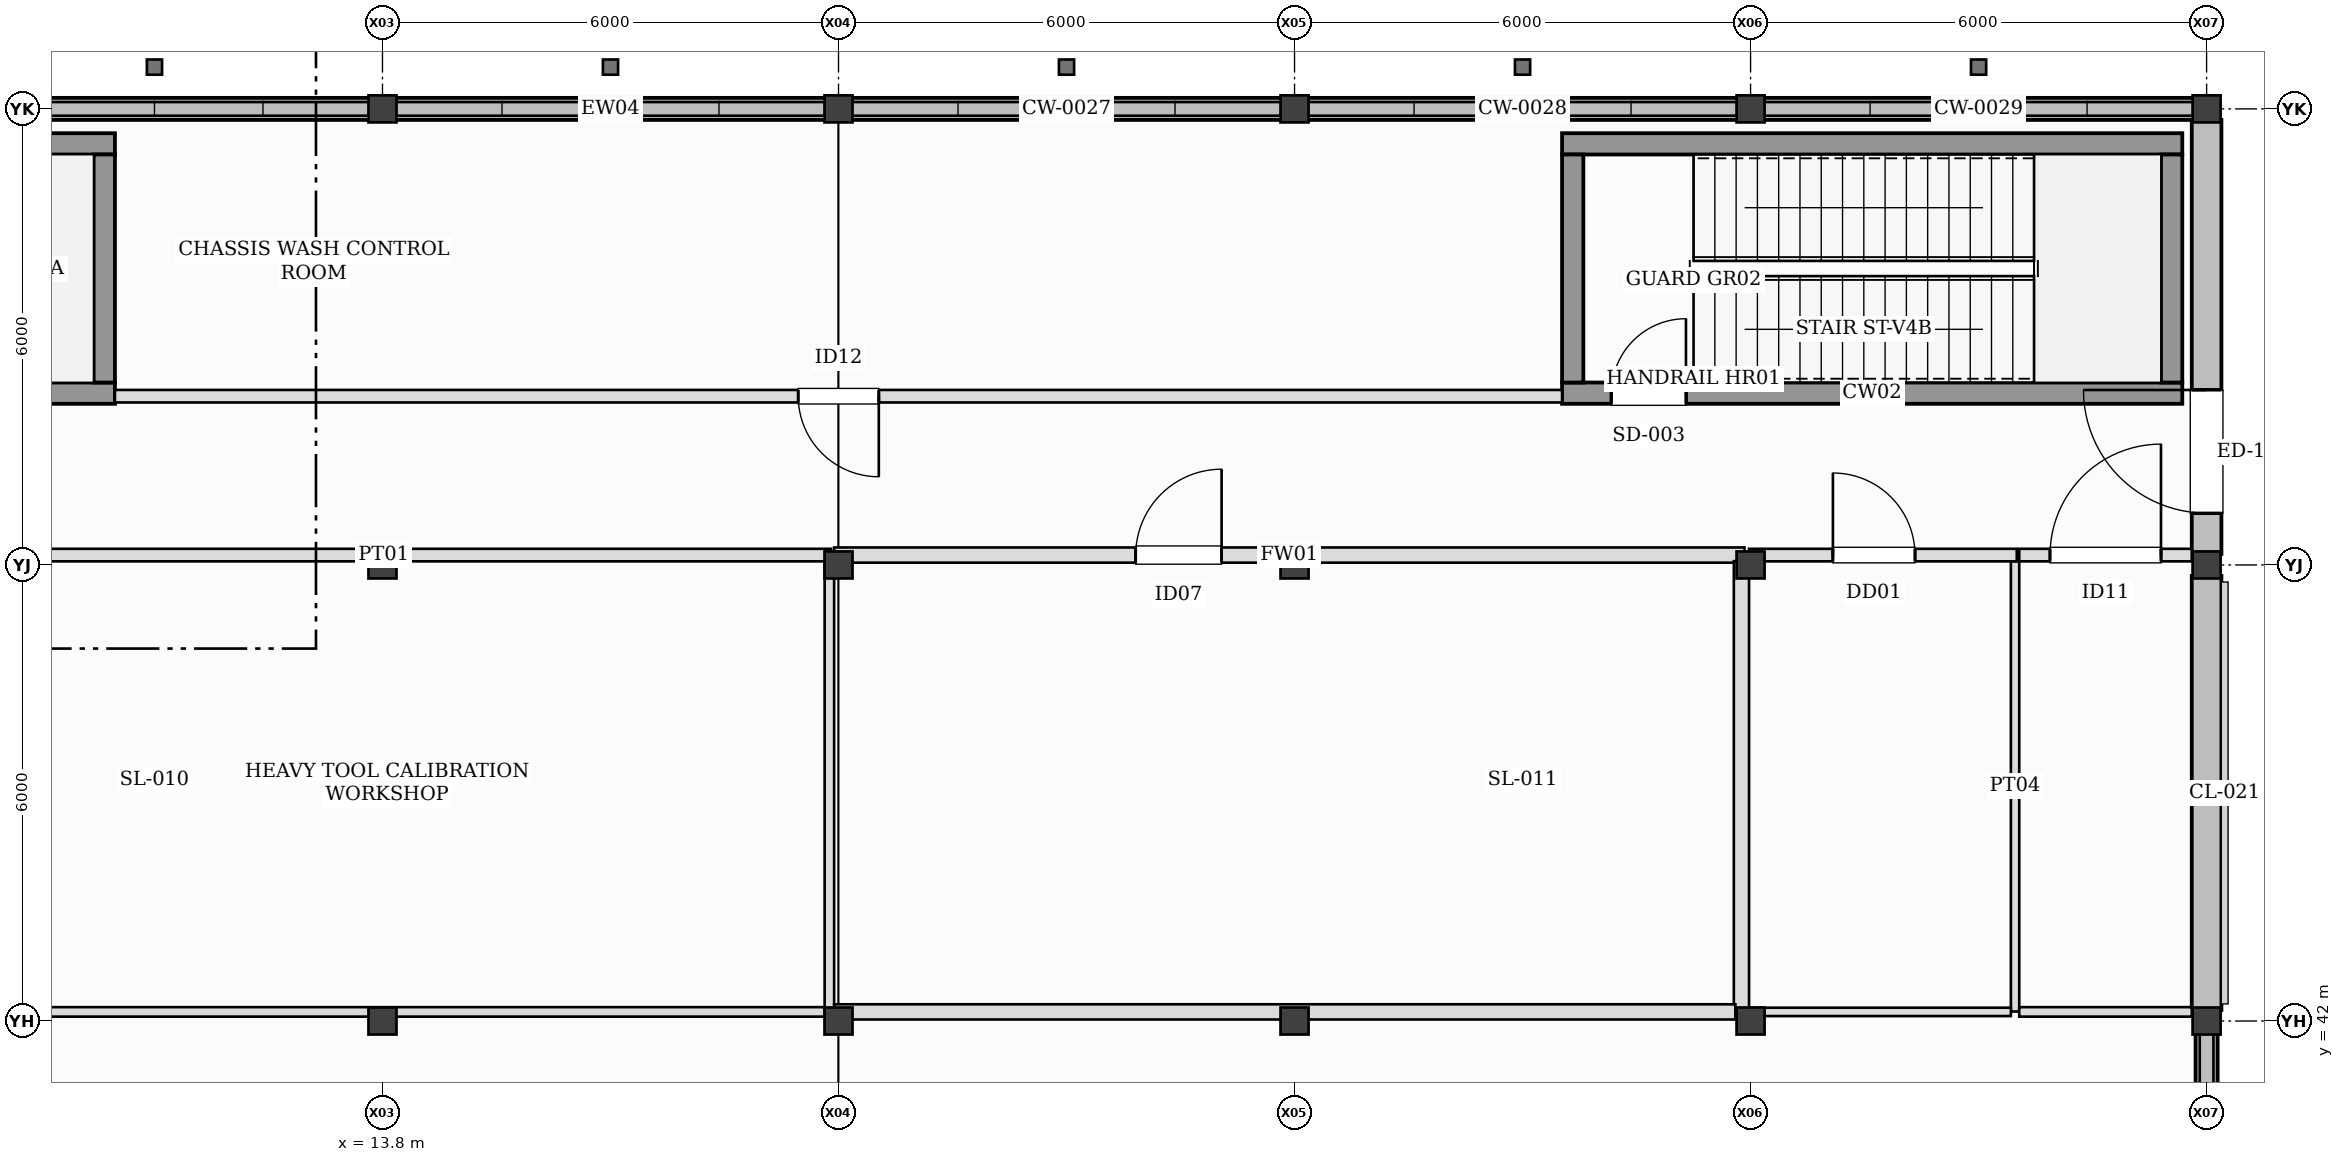
"""IFC4 building model, lengths in metres.
Left out: names, types, materials, properties, quantities, classifications, styles, units other than length and angle.
Written with IfcOpenShell. Run it as: python <this file> out.ifc"""

import sys

from ifc_helpers import new_model, si_unit, direction, frame, frame_2d, origin, origin_2d, place, context, subcontext, project, spatial, rectangle, hollow_rectangle, i_section, extrude, element, fill, save


model = new_model("IFC4")
c1 = context("Model", 3, precision=1e-05, world=origin(), true_north=direction((0.0, 1.0)))
c2 = subcontext(c1, "Body", "Model", "MODEL_VIEW")
j1 = project(units=[si_unit("LENGTHUNIT", "METRE"), si_unit("PLANEANGLEUNIT", "RADIAN")], contexts=[c1])
p1 = place(None, origin())
s1 = spatial("IfcSite", under=j1, at=p1, CompositionType="ELEMENT")
p2 = place(p1, origin())
s2 = spatial("IfcBuilding", under=s1, at=p2, CompositionType="ELEMENT")
p3 = place(p2, origin())
s3 = spatial("IfcBuildingStorey", under=s2, at=p3, CompositionType="ELEMENT", Elevation=0.0)
for number, where, z_axis, x_axis in (
    (1, (13.8, 42.0, -0.41), (0.0, 0.0, 1.0), (1.0, 0.0, 0.0)),
    (2, (13.8, 48.0, -0.41), (0.0, 0.0, 1.0), (1.0, 0.0, 0.0)),
    (3, (13.8, 54.0, -0.41), (0.0, 0.0, 1.0), (1.0, 0.0, 0.0)),
    (4, (19.8, 42.0, -0.41), (0.0, 0.0, 1.0), (1.0, 0.0, 0.0)),
    (5, (19.8, 48.0, -0.41), (0.0, 0.0, 1.0), (1.0, 0.0, 0.0)),
    (6, (19.8, 54.0, -0.41), (0.0, 0.0, 1.0), (1.0, 0.0, 0.0)),
    (7, (25.8, 42.0, -0.41), (0.0, 0.0, 1.0), (1.0, 0.0, 0.0)),
    (8, (25.8, 48.0, -0.41), (0.0, 0.0, 1.0), (1.0, 0.0, 0.0)),
    (9, (25.8, 54.0, -0.41), (0.0, 0.0, 1.0), (1.0, 0.0, 0.0)),
    (10, (31.8, 42.0, -0.41), (0.0, 0.0, 1.0), (1.0, 0.0, 0.0)),
    (11, (31.8, 48.0, -0.41), (0.0, 0.0, 1.0), (1.0, 0.0, 0.0)),
    (12, (31.8, 54.0, -0.41), (0.0, 0.0, 1.0), (1.0, 0.0, 0.0)),
    (13, (37.8, 42.0, -0.41), (0.0, 0.0, 1.0), (1.0, 0.0, 0.0)),
    (14, (37.8, 48.0, -0.41), (0.0, 0.0, 1.0), (1.0, 0.0, 0.0)),
    (15, (37.8, 54.0, -0.41), (0.0, 0.0, 1.0), (1.0, 0.0, 0.0)),
):
    element("IfcColumn", number, at=place(p3, frame(where, z_axis=z_axis, x_axis=x_axis)), inside=s3, PredefinedType="COLUMN", context=c2, shape_type="SweptSolid", body=[
        extrude(i_section(OverallWidth=0.369, OverallDepth=0.356, WebThickness=0.011, FlangeThickness=0.018, at=origin_2d()), origin(), (0.0, 0.0, 1.0), 6.41),
    ])
for number, where, z_axis, x_axis in (
    (16, (10.8, 54.55, -0.35), (0.0, 0.0, 1.0), (1.0, 0.0, 0.0)),
    (17, (16.8, 54.55, -0.35), (0.0, 0.0, 1.0), (1.0, 0.0, 0.0)),
    (18, (22.8, 54.55, -0.35), (0.0, 0.0, 1.0), (1.0, 0.0, 0.0)),
    (19, (28.8, 54.55, -0.35), (0.0, 0.0, 1.0), (1.0, 0.0, 0.0)),
    (20, (34.8, 54.55, -0.35), (0.0, 0.0, 1.0), (1.0, 0.0, 0.0)),
):
    element("IfcColumn", number, at=place(p3, frame(where, z_axis=z_axis, x_axis=x_axis)), inside=s3, PredefinedType="PILASTER", context=c2, shape_type="SweptSolid", body=[
        extrude(hollow_rectangle(XDim=0.2, YDim=0.2, WallThickness=0.01, at=origin_2d()), origin(), (0.0, 0.0, 1.0), 6.35),
    ])
p4 = place(p3, frame((13.655, 54.0, 0.0), z_axis=(0.0, 0.0, 1.0), x_axis=(-1.0, 0.0, 0.0)))
e21 = element("IfcWall", 21, at=p4, inside=s3, PredefinedType="STANDARD", context=c2, shape_type="SweptSolid", body=[
    extrude(rectangle(XDim=5.71, YDim=0.29, at=frame_2d((2.855, 0.0))), origin(), (0.0, 0.0, 1.0), 0.32),
])
p5 = place(p3, frame((19.655, 54.0, 0.0), z_axis=(0.0, 0.0, 1.0), x_axis=(-1.0, 0.0, 0.0)))
e22 = element("IfcWall", 22, at=p5, inside=s3, PredefinedType="STANDARD", context=c2, shape_type="SweptSolid", body=[
    extrude(rectangle(XDim=5.71, YDim=0.29, at=frame_2d((2.855, 0.0))), origin(), (0.0, 0.0, 1.0), 0.44),
])
p6 = place(p3, frame((25.655, 54.0, 0.0), z_axis=(0.0, 0.0, 1.0), x_axis=(-1.0, 0.0, 0.0)))
e23 = element("IfcWall", 23, at=p6, inside=s3, PredefinedType="STANDARD", context=c2, shape_type="SweptSolid", body=[
    extrude(rectangle(XDim=5.71, YDim=0.29, at=frame_2d((2.855, 0.0))), origin(), (0.0, 0.0, 1.0), 0.56),
])
p7 = place(p3, frame((31.655, 54.0, 0.0), z_axis=(0.0, 0.0, 1.0), x_axis=(-1.0, 0.0, 0.0)))
e24 = element("IfcWall", 24, at=p7, inside=s3, PredefinedType="STANDARD", context=c2, shape_type="SweptSolid", body=[
    extrude(rectangle(XDim=5.71, YDim=0.29, at=frame_2d((2.855, 0.0))), origin(), (0.0, 0.0, 1.0), 0.68),
])
p8 = place(p3, frame((37.655, 54.0, 0.0), z_axis=(0.0, 0.0, 1.0), x_axis=(-1.0, 0.0, 0.0)))
e25 = element("IfcWall", 25, at=p8, inside=s3, PredefinedType="STANDARD", context=c2, shape_type="SweptSolid", body=[
    extrude(rectangle(XDim=5.71, YDim=0.29, at=frame_2d((2.855, 0.0))), origin(), (0.0, 0.0, 1.0), 0.8),
])
p9 = place(p3, frame((37.8, 36.145, 0.0), z_axis=(0.0, 0.0, 1.0), x_axis=(0.0, 1.0, 0.0)))
e26 = element("IfcWall", 26, at=p9, inside=s3, PredefinedType="STANDARD", context=c2, shape_type="SweptSolid", body=[
    extrude(rectangle(XDim=5.71, YDim=0.29, at=frame_2d((2.855, 0.0))), origin(), (0.0, 0.0, 1.0), 0.56),
])
p10 = place(p3, frame((37.8, 42.145, 0.0), z_axis=(0.0, 0.0, 1.0), x_axis=(0.0, 1.0, 0.0)))
e27 = element("IfcWall", 27, at=p10, inside=s3, PredefinedType="STANDARD", context=c2, shape_type="SweptSolid", body=[
    extrude(rectangle(XDim=5.71, YDim=0.39, at=frame_2d((2.855, 0.0))), origin(), (0.0, 0.0, 1.0), 5.044),
])
p11 = place(p3, frame((37.8, 48.145, 0.0), z_axis=(0.0, 0.0, 1.0), x_axis=(0.0, 1.0, 0.0)))
e28 = element("IfcWall", 28, at=p11, inside=s3, PredefinedType="STANDARD", context=c2, shape_type="SweptSolid", body=[
    extrude(rectangle(XDim=5.71, YDim=0.39, at=frame_2d((2.855, 0.0))), origin(), (0.0, 0.0, 1.0), 5.044),
])
p12 = place(p11, frame((0.537, 0.0, 0.0)))
e29 = element("IfcOpeningElement", 29, at=p12, cuts=e28, PredefinedType="OPENING", context=c2, shape_type="SweptSolid", body=[
    extrude(rectangle(XDim=1.62, YDim=2.2, at=frame_2d((0.81, 1.1))), frame((0.0, 0.205, 0.0), z_axis=(0.0, -1.0, 0.0), x_axis=(1.0, 0.0, 0.0)), (0.0, 0.0, 1.0), 0.41),
])
p13 = place(p3, frame((2.12, 50.26, 0.0), z_axis=(0.0, 0.0, 1.0), x_axis=(1.0, 0.0, 0.0)))
e30 = element("IfcWall", 30, at=p13, inside=s3, PredefinedType="SHEAR", context=c2, shape_type="SweptSolid", body=[
    extrude(rectangle(XDim=8.16, YDim=0.28, at=frame_2d((4.08, 0.0))), origin(), (0.0, 0.0, 1.0), 6.0),
])
p14 = place(p13, frame((0.65, 0.0, 0.0)))
e31 = element("IfcOpeningElement", 31, at=p14, cuts=e30, PredefinedType="OPENING", context=c2, shape_type="SweptSolid", body=[
    extrude(rectangle(XDim=0.98, YDim=2.15, at=frame_2d((0.49, 1.075))), frame((0.0, 0.15, 0.0), z_axis=(0.0, -1.0, 0.0), x_axis=(1.0, 0.0, 0.0)), (0.0, 0.0, 1.0), 0.3),
])
p15 = place(p3, frame((10.28, 53.54, 0.0), z_axis=(0.0, 0.0, 1.0), x_axis=(-1.0, 0.0, 0.0)))
e32 = element("IfcWall", 32, at=p15, inside=s3, PredefinedType="SHEAR", context=c2, shape_type="SweptSolid", body=[
    extrude(rectangle(XDim=8.16, YDim=0.28, at=frame_2d((4.08, 0.0))), origin(), (0.0, 0.0, 1.0), 6.0),
])
p16 = place(p3, frame((10.14, 50.4, 0.0), z_axis=(0.0, 0.0, 1.0), x_axis=(0.0, 1.0, 0.0)))
e33 = element("IfcWall", 33, at=p16, inside=s3, PredefinedType="SHEAR", context=c2, shape_type="SweptSolid", body=[
    extrude(rectangle(XDim=3.0, YDim=0.28, at=frame_2d((1.5, 0.0))), origin(), (0.0, 0.0, 1.0), 6.0),
])
p17 = place(p3, frame((29.32, 50.26, 0.0), z_axis=(0.0, 0.0, 1.0), x_axis=(1.0, 0.0, 0.0)))
e34 = element("IfcWall", 34, at=p17, inside=s3, PredefinedType="SHEAR", context=c2, shape_type="SweptSolid", body=[
    extrude(rectangle(XDim=8.16, YDim=0.28, at=frame_2d((4.08, 0.0))), origin(), (0.0, 0.0, 1.0), 6.0),
])
p18 = place(p17, frame((0.65, 0.0, 0.0)))
e35 = element("IfcOpeningElement", 35, at=p18, cuts=e34, PredefinedType="OPENING", context=c2, shape_type="SweptSolid", body=[
    extrude(rectangle(XDim=0.98, YDim=2.15, at=frame_2d((0.49, 1.075))), frame((0.0, 0.15, 0.0), z_axis=(0.0, -1.0, 0.0), x_axis=(1.0, 0.0, 0.0)), (0.0, 0.0, 1.0), 0.3),
])
p19 = place(p3, frame((37.48, 53.54, 0.0), z_axis=(0.0, 0.0, 1.0), x_axis=(-1.0, 0.0, 0.0)))
e36 = element("IfcWall", 36, at=p19, inside=s3, PredefinedType="SHEAR", context=c2, shape_type="SweptSolid", body=[
    extrude(rectangle(XDim=8.16, YDim=0.28, at=frame_2d((4.08, 0.0))), origin(), (0.0, 0.0, 1.0), 6.0),
])
for number, where, z_axis, x_axis in (
    (37, (29.46, 53.4, 0.0), (0.0, 0.0, 1.0), (0.0, -1.0, 0.0)),
    (38, (37.34, 50.4, 0.0), (0.0, 0.0, 1.0), (0.0, 1.0, 0.0)),
):
    element("IfcWall", number, at=place(p3, frame(where, z_axis=z_axis, x_axis=x_axis)), inside=s3, PredefinedType="SHEAR", context=c2, shape_type="SweptSolid", body=[
        extrude(rectangle(XDim=3.0, YDim=0.28, at=frame_2d((1.5, 0.0))), origin(), (0.0, 0.0, 1.0), 6.0),
    ])
p20 = place(p3, frame((7.933, 48.13, 0.0), z_axis=(0.0, 0.0, 1.0), x_axis=(1.0, 0.0, 0.0)))
e39 = element("IfcWall", 39, at=p20, inside=s3, PredefinedType="PARTITIONING", context=c2, shape_type="SweptSolid", body=[
    extrude(rectangle(XDim=11.77, YDim=0.165, at=frame_2d((5.885, 0.0))), origin(), (0.0, 0.0, 1.0), 5.113),
])
p21 = place(p3, frame((19.68, 48.05, 0.0), z_axis=(0.0, 0.0, 1.0), x_axis=(0.0, -1.0, 0.0)))
e40 = element("IfcWall", 40, at=p21, inside=s3, PredefinedType="PARTITIONING", context=c2, shape_type="SweptSolid", body=[
    extrude(rectangle(XDim=5.933, YDim=0.125, at=frame_2d((2.966, 0.0))), origin(), (0.0, 0.0, 1.0), 5.044),
])
p22 = place(p3, frame((19.617, 42.12, 0.0), z_axis=(0.0, 0.0, 1.0), x_axis=(-1.0, 0.0, 0.0)))
e41 = element("IfcWall", 41, at=p22, inside=s3, PredefinedType="PARTITIONING", context=c2, shape_type="SweptSolid", body=[
    extrude(rectangle(XDim=11.685, YDim=0.125, at=frame_2d((5.842, 0.0))), origin(), (0.0, 0.0, 1.0), 5.113),
])
p23 = place(p3, frame((19.742, 48.13, 0.0), z_axis=(0.0, 0.0, 1.0), x_axis=(1.0, 0.0, 0.0)))
e42 = element("IfcWall", 42, at=p23, inside=s3, PredefinedType="PARTITIONING", context=c2, shape_type="SweptSolid", body=[
    extrude(rectangle(XDim=11.978, YDim=0.2, at=frame_2d((5.989, 0.0))), origin(), (0.0, 0.0, 1.0), 5.113),
])
p24 = place(p23, frame((3.968, 0.0, 0.0)))
e43 = element("IfcOpeningElement", 43, at=p24, cuts=e42, PredefinedType="OPENING", context=c2, shape_type="SweptSolid", body=[
    extrude(rectangle(XDim=1.13, YDim=2.18, at=frame_2d((0.565, 1.09))), frame((0.0, 0.11, 0.0), z_axis=(0.0, -1.0, 0.0), x_axis=(1.0, 0.0, 0.0)), (0.0, 0.0, 1.0), 0.22),
])
p25 = place(p3, frame((31.68, 48.05, 0.0), z_axis=(0.0, 0.0, 1.0), x_axis=(0.0, -1.0, 0.0)))
e44 = element("IfcWall", 44, at=p25, inside=s3, PredefinedType="PARTITIONING", context=c2, shape_type="SweptSolid", body=[
    extrude(rectangle(XDim=5.97, YDim=0.2, at=frame_2d((2.985, 0.0))), origin(), (0.0, 0.0, 1.0), 5.044),
])
p26 = place(p3, frame((31.6, 42.12, 0.0), z_axis=(0.0, 0.0, 1.0), x_axis=(-1.0, 0.0, 0.0)))
e45 = element("IfcWall", 45, at=p26, inside=s3, PredefinedType="PARTITIONING", context=c2, shape_type="SweptSolid", body=[
    extrude(rectangle(XDim=11.858, YDim=0.2, at=frame_2d((5.929, 0.0))), origin(), (0.0, 0.0, 1.0), 5.113),
])
p27 = place(p3, frame((31.78, 48.13, 0.0), z_axis=(0.0, 0.0, 1.0), x_axis=(1.0, 0.0, 0.0)))
e46 = element("IfcWall", 46, at=p27, inside=s3, PredefinedType="PARTITIONING", context=c2, shape_type="SweptSolid", body=[
    extrude(rectangle(XDim=3.522, YDim=0.165, at=frame_2d((1.761, 0.0))), origin(), (0.0, 0.0, 1.0), 5.113),
])
p28 = place(p27, frame((1.103, 0.0, 0.0)))
e47 = element("IfcOpeningElement", 47, at=p28, cuts=e46, PredefinedType="OPENING", context=c2, shape_type="SweptSolid", body=[
    extrude(rectangle(XDim=1.08, YDim=2.14, at=frame_2d((0.54, 1.07))), frame((0.0, 0.093, 0.0), z_axis=(0.0, -1.0, 0.0), x_axis=(1.0, 0.0, 0.0)), (0.0, 0.0, 1.0), 0.185),
])
p29 = place(p3, frame((35.28, 48.05, 0.0), z_axis=(0.0, 0.0, 1.0), x_axis=(0.0, -1.0, 0.0)))
e48 = element("IfcWall", 48, at=p29, inside=s3, PredefinedType="PARTITIONING", context=c2, shape_type="SweptSolid", body=[
    extrude(rectangle(XDim=5.925, YDim=0.11, at=frame_2d((2.962, 0.0))), origin(), (0.0, 0.0, 1.0), 5.68),
])
p30 = place(p3, frame((35.225, 42.12, 0.0), z_axis=(0.0, 0.0, 1.0), x_axis=(-1.0, 0.0, 0.0)))
e49 = element("IfcWall", 49, at=p30, inside=s3, PredefinedType="PARTITIONING", context=c2, shape_type="SweptSolid", body=[
    extrude(rectangle(XDim=3.445, YDim=0.11, at=frame_2d((1.723, 0.0))), origin(), (0.0, 0.0, 1.0), 5.113),
])
p31 = place(p3, frame((35.335, 48.13, 0.0), z_axis=(0.0, 0.0, 1.0), x_axis=(1.0, 0.0, 0.0)))
e50 = element("IfcWall", 50, at=p31, inside=s3, PredefinedType="PARTITIONING", context=c2, shape_type="SweptSolid", body=[
    extrude(rectangle(XDim=2.27, YDim=0.165, at=frame_2d((1.135, 0.0))), origin(), (0.0, 0.0, 1.0), 5.113),
])
p32 = place(p31, frame((0.405, 0.0, 0.0)))
e51 = element("IfcOpeningElement", 51, at=p32, cuts=e50, PredefinedType="OPENING", context=c2, shape_type="SweptSolid", body=[
    extrude(rectangle(XDim=1.46, YDim=2.3, at=frame_2d((0.73, 1.15))), frame((0.0, 0.093, 0.0), z_axis=(0.0, -1.0, 0.0), x_axis=(1.0, 0.0, 0.0)), (0.0, 0.0, 1.0), 0.185),
])
p33 = place(p3, frame((37.605, 42.12, 0.0), z_axis=(0.0, 0.0, 1.0), x_axis=(-1.0, 0.0, 0.0)))
e52 = element("IfcWall", 52, at=p33, inside=s3, PredefinedType="PARTITIONING", context=c2, shape_type="SweptSolid", body=[
    extrude(rectangle(XDim=2.27, YDim=0.125, at=frame_2d((1.135, 0.0))), origin(), (0.0, 0.0, 1.0), 5.113),
])
p34 = place(p3, frame((29.32, 50.22, 0.0), z_axis=(0.0, 0.0, 1.0), x_axis=(-1.0, 0.0, 0.0)))
e53 = element("IfcWall", 53, at=p34, inside=s3, PredefinedType="PARTITIONING", context=c2, shape_type="SweptSolid", body=[
    extrude(rectangle(XDim=19.04, YDim=0.165, at=frame_2d((9.52, 0.0))), origin(), (0.0, 0.0, 1.0), 5.68),
])
p35 = place(p34, frame((8.99, 0.0, 0.0)))
e54 = element("IfcOpeningElement", 54, at=p35, cuts=e53, PredefinedType="OPENING", context=c2, shape_type="SweptSolid", body=[
    extrude(rectangle(XDim=1.06, YDim=2.25, at=frame_2d((0.53, 1.125))), frame((0.0, 0.093, 0.0), z_axis=(0.0, -1.0, 0.0), x_axis=(1.0, 0.0, 0.0)), (0.0, 0.0, 1.0), 0.185),
])
p36 = place(p12, frame((1.62, 0.0, 0.0), z_axis=(0.0, 0.0, 1.0), x_axis=(-1.0, 0.0, 0.0)))
e55 = element("IfcDoor", 55, at=p36, inside=s3, OperationType="SINGLE_SWING_RIGHT", PredefinedType="DOOR", context=c2, shape_type="SweptSolid", body=[
    extrude(rectangle(XDim=1.62, YDim=2.2, at=frame_2d((0.81, 1.1))), frame((0.0, 0.025, 0.0), z_axis=(0.0, -1.0, 0.0), x_axis=(1.0, 0.0, 0.0)), (0.0, 0.0, 1.0), 0.05),
])
fill(e29, e55)
p37 = place(p18, origin())
e56 = element("IfcDoor", 56, at=p37, inside=s3, OperationType="SINGLE_SWING_RIGHT", PredefinedType="DOOR", context=c2, shape_type="SweptSolid", body=[
    extrude(rectangle(XDim=0.98, YDim=2.15, at=frame_2d((0.49, 1.075))), frame((0.0, 0.025, 0.0), z_axis=(0.0, -1.0, 0.0), x_axis=(1.0, 0.0, 0.0)), (0.0, 0.0, 1.0), 0.05),
])
fill(e35, e56)
p38 = place(p24, frame((1.13, 0.0, 0.0), z_axis=(0.0, 0.0, 1.0), x_axis=(-1.0, 0.0, 0.0)))
e57 = element("IfcDoor", 57, at=p38, inside=s3, OperationType="SINGLE_SWING_RIGHT", PredefinedType="DOOR", context=c2, shape_type="SweptSolid", body=[
    extrude(rectangle(XDim=1.13, YDim=2.18, at=frame_2d((0.565, 1.09))), frame((0.0, 0.025, 0.0), z_axis=(0.0, -1.0, 0.0), x_axis=(1.0, 0.0, 0.0)), (0.0, 0.0, 1.0), 0.05),
])
fill(e43, e57)
p39 = place(p28, frame((1.08, 0.0, 0.0), z_axis=(0.0, 0.0, 1.0), x_axis=(-1.0, 0.0, 0.0)))
e58 = element("IfcDoor", 58, at=p39, inside=s3, OperationType="SINGLE_SWING_LEFT", PredefinedType="DOOR", context=c2, shape_type="SweptSolid", body=[
    extrude(rectangle(XDim=1.08, YDim=2.14, at=frame_2d((0.54, 1.07))), frame((0.0, 0.025, 0.0), z_axis=(0.0, -1.0, 0.0), x_axis=(1.0, 0.0, 0.0)), (0.0, 0.0, 1.0), 0.05),
])
fill(e47, e58)
p40 = place(p32, frame((1.46, 0.0, 0.0), z_axis=(0.0, 0.0, 1.0), x_axis=(-1.0, 0.0, 0.0)))
e59 = element("IfcDoor", 59, at=p40, inside=s3, OperationType="SINGLE_SWING_RIGHT", PredefinedType="DOOR", context=c2, shape_type="SweptSolid", body=[
    extrude(rectangle(XDim=1.46, YDim=2.3, at=frame_2d((0.73, 1.15))), frame((0.0, 0.025, 0.0), z_axis=(0.0, -1.0, 0.0), x_axis=(1.0, 0.0, 0.0)), (0.0, 0.0, 1.0), 0.05),
])
fill(e51, e59)
p41 = place(p35, frame((1.06, 0.0, 0.0), z_axis=(0.0, 0.0, 1.0), x_axis=(-1.0, 0.0, 0.0)))
e60 = element("IfcDoor", 60, at=p41, inside=s3, OperationType="SINGLE_SWING_LEFT", PredefinedType="DOOR", context=c2, shape_type="SweptSolid", body=[
    extrude(rectangle(XDim=1.06, YDim=2.25, at=frame_2d((0.53, 1.125))), frame((0.0, 0.025, 0.0), z_axis=(0.0, -1.0, 0.0), x_axis=(1.0, 0.0, 0.0)), (0.0, 0.0, 1.0), 0.05),
])
fill(e54, e60)
save(model, sys.argv[1])
